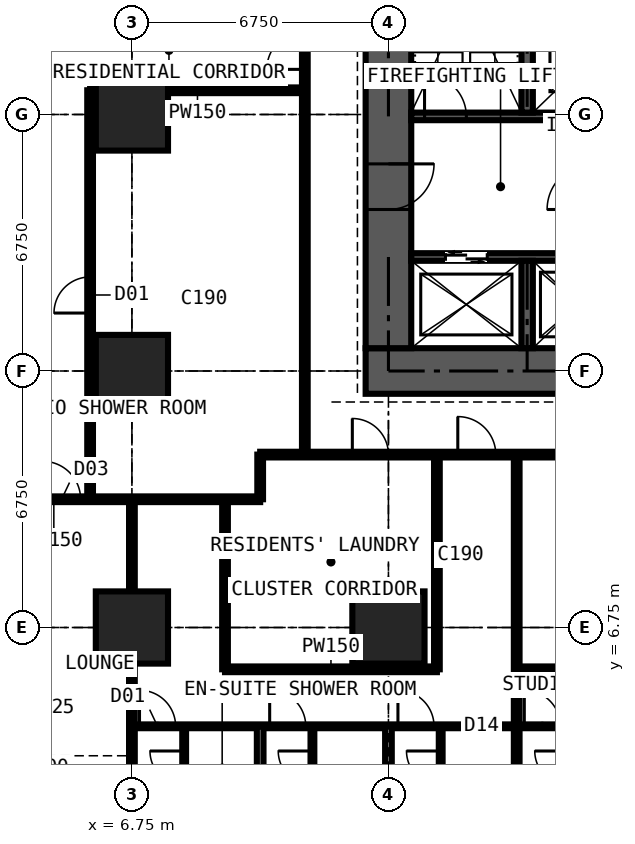
"""IFC4 building model, lengths in metres.
Left out: names, types, materials, properties, quantities, classifications, styles, units other than length and angle.
Written with IfcOpenShell. Run it as: python <this file> out.ifc"""

import sys

from ifc_helpers import new_model, si_unit, direction, frame, frame_2d, origin, origin_2d, place, context, subcontext, project, spatial, rectangle, extrude, element, fill, save


model = new_model("IFC4")
c1 = context("Model", 3, precision=1e-05, world=origin(), true_north=direction((0.0, 1.0)))
c2 = subcontext(c1, "Body", "Model", "MODEL_VIEW")
j1 = project(units=[si_unit("LENGTHUNIT", "METRE"), si_unit("PLANEANGLEUNIT", "RADIAN")], contexts=[c1])
p1 = place(None, origin())
s1 = spatial("IfcSite", under=j1, at=p1, CompositionType="ELEMENT")
p2 = place(p1, origin())
s2 = spatial("IfcBuilding", under=s1, at=p2, CompositionType="ELEMENT")
p3 = place(p2, frame((0.0, 0.0, 36.0)))
s3 = spatial("IfcBuildingStorey", under=s2, at=p3, CompositionType="ELEMENT", Elevation=36.0)
for number, where, z_axis, x_axis in (
    (1, (6.75, 6.75, 0.0), (0.0, 0.0, 1.0), (1.0, 0.0, 0.0)),
    (2, (6.75, 13.5, 0.0), (0.0, 0.0, 1.0), (1.0, 0.0, 0.0)),
    (3, (6.75, 20.25, 0.0), (0.0, 0.0, 1.0), (1.0, 0.0, 0.0)),
    (4, (13.5, 6.75, 0.0), (0.0, 0.0, 1.0), (1.0, 0.0, 0.0)),
):
    element("IfcColumn", number, at=place(p3, frame(where, z_axis=z_axis, x_axis=x_axis)), inside=s3, PredefinedType="COLUMN", context=c2, shape_type="SweptSolid", body=[
        extrude(rectangle(XDim=1.9, YDim=1.9, at=origin_2d()), origin(), (0.0, 0.0, 1.0), 3.6),
    ])
p4 = place(p3, frame((12.9, 13.5, 0.0), z_axis=(0.0, 0.0, 1.0), x_axis=(1.0, 0.0, 0.0)))
e5 = element("IfcWall", 5, at=p4, inside=s3, PredefinedType="SHEAR", context=c2, shape_type="SweptSolid", body=[
    extrude(rectangle(XDim=14.7, YDim=1.2, at=frame_2d((7.35, 0.0))), origin(), (0.0, 0.0, 1.0), 3.6),
])
p5 = place(p3, frame((13.5, 26.4, 0.0), z_axis=(0.0, 0.0, 1.0), x_axis=(0.0, -1.0, 0.0)))
e6 = element("IfcWall", 6, at=p5, inside=s3, PredefinedType="SHEAR", context=c2, shape_type="SweptSolid", body=[
    extrude(rectangle(XDim=12.3, YDim=1.2, at=frame_2d((6.15, 0.0))), origin(), (0.0, 0.0, 1.0), 3.6),
])
p6 = place(p5, frame((7.45, 0.0, 0.0)))
e7 = element("IfcOpeningElement", 7, at=p6, cuts=e6, PredefinedType="OPENING", context=c2, shape_type="SweptSolid", body=[
    extrude(rectangle(XDim=1.2, YDim=2.2, at=frame_2d((0.6, 1.1))), frame((0.0, 0.61, 0.0), z_axis=(0.0, -1.0, 0.0), x_axis=(1.0, 0.0, 0.0)), (0.0, 0.0, 1.0), 1.22),
])
p7 = place(p3, frame((14.1, 16.5, 0.0), z_axis=(0.0, 0.0, 1.0), x_axis=(1.0, 0.0, 0.0)))
e8 = element("IfcWall", 8, at=p7, inside=s3, PredefinedType="SHEAR", context=c2, shape_type="SweptSolid", body=[
    extrude(rectangle(XDim=12.3, YDim=0.2, at=frame_2d((6.15, 0.0))), origin(), (0.0, 0.0, 1.0), 3.6),
])
p8 = place(p7, frame((0.9, 0.0, 0.0)))
e9 = element("IfcOpeningElement", 9, at=p8, cuts=e8, PredefinedType="OPENING", context=c2, shape_type="SweptSolid", body=[
    extrude(rectangle(XDim=1.1, YDim=2.2, at=frame_2d((0.55, 1.1))), frame((0.0, 0.11, 0.0), z_axis=(0.0, -1.0, 0.0), x_axis=(1.0, 0.0, 0.0)), (0.0, 0.0, 1.0), 0.22),
])
p9 = place(p7, frame((9.5, 0.0, 0.0)))
e10 = element("IfcOpeningElement", 10, at=p9, cuts=e8, PredefinedType="OPENING", context=c2, shape_type="SweptSolid", body=[
    extrude(rectangle(XDim=1.1, YDim=2.2, at=frame_2d((0.55, 1.1))), frame((0.0, 0.11, 0.0), z_axis=(0.0, -1.0, 0.0), x_axis=(1.0, 0.0, 0.0)), (0.0, 0.0, 1.0), 0.22),
])
p10 = place(p3, frame((14.1, 20.2, 0.0), z_axis=(0.0, 0.0, 1.0), x_axis=(1.0, 0.0, 0.0)))
e11 = element("IfcWall", 11, at=p10, inside=s3, PredefinedType="SHEAR", context=c2, shape_type="SweptSolid", body=[
    extrude(rectangle(XDim=12.3, YDim=0.2, at=frame_2d((6.15, 0.0))), origin(), (0.0, 0.0, 1.0), 3.6),
])
p11 = place(p10, frame((0.35, 0.0, 0.0)))
e12 = element("IfcOpeningElement", 12, at=p11, cuts=e11, PredefinedType="OPENING", context=c2, shape_type="SweptSolid", body=[
    extrude(rectangle(XDim=1.1, YDim=2.2, at=frame_2d((0.55, 1.1))), frame((0.0, 0.11, 0.0), z_axis=(0.0, -1.0, 0.0), x_axis=(1.0, 0.0, 0.0)), (0.0, 0.0, 1.0), 0.22),
])
p12 = place(p10, frame((9.75, 0.0, 0.0)))
e13 = element("IfcOpeningElement", 13, at=p12, cuts=e11, PredefinedType="OPENING", context=c2, shape_type="SweptSolid", body=[
    extrude(rectangle(XDim=1.1, YDim=2.2, at=frame_2d((0.55, 1.1))), frame((0.0, 0.11, 0.0), z_axis=(0.0, -1.0, 0.0), x_axis=(1.0, 0.0, 0.0)), (0.0, 0.0, 1.0), 0.22),
])
p13 = place(p3, frame((17.15, 20.3, 0.0), z_axis=(0.0, 0.0, 1.0), x_axis=(0.0, 1.0, 0.0)))
e14 = element("IfcWall", 14, at=p13, inside=s3, PredefinedType="SHEAR", context=c2, shape_type="SweptSolid", body=[
    extrude(rectangle(XDim=6.1, YDim=0.3, at=frame_2d((3.05, 0.0))), origin(), (0.0, 0.0, 1.0), 3.6),
])
p14 = place(p3, frame((17.15, 14.1, 0.0), z_axis=(0.0, 0.0, 1.0), x_axis=(0.0, 1.0, 0.0)))
e15 = element("IfcWall", 15, at=p14, inside=s3, PredefinedType="SHEAR", context=c2, shape_type="SweptSolid", body=[
    extrude(rectangle(XDim=2.3, YDim=0.3, at=frame_2d((1.15, 0.0))), origin(), (0.0, 0.0, 1.0), 3.6),
])
p15 = place(p3, frame((-0.734, 10.125, 0.0), z_axis=(0.0, 0.0, 1.0), x_axis=(1.0, 0.0, 0.0)))
e16 = element("IfcWall", 16, at=p15, inside=s3, PredefinedType="PARTITIONING", context=c2, shape_type="SweptSolid", body=[
    extrude(rectangle(XDim=10.859, YDim=0.15, at=frame_2d((5.429, 0.0))), origin(), (0.0, 0.0, 1.0), 3.375),
])
p16 = place(p15, frame((5.134, 0.0, 0.0)))
e17 = element("IfcOpeningElement", 17, at=p16, cuts=e16, PredefinedType="OPENING", context=c2, shape_type="SweptSolid", body=[
    extrude(rectangle(XDim=1.0, YDim=2.2, at=frame_2d((0.5, 1.1))), frame((0.0, 0.085, 0.0), z_axis=(0.0, -1.0, 0.0), x_axis=(1.0, 0.0, 0.0)), (0.0, 0.0, 1.0), 0.17),
])
p17 = place(p3, frame((5.65, 10.125, 0.0), z_axis=(0.0, 0.0, 1.0), x_axis=(0.0, 1.0, 0.0)))
e18 = element("IfcWall", 18, at=p17, inside=s3, PredefinedType="PARTITIONING", context=c2, shape_type="SweptSolid", body=[
    extrude(rectangle(XDim=10.762, YDim=0.15, at=frame_2d((5.381, 0.0))), origin(), (0.0, 0.0, 1.0), 3.375),
])
p18 = place(p17, frame((4.9, 0.0, 0.0)))
e19 = element("IfcOpeningElement", 19, at=p18, cuts=e18, PredefinedType="OPENING", context=c2, shape_type="SweptSolid", body=[
    extrude(rectangle(XDim=0.95, YDim=2.2, at=frame_2d((0.475, 1.1))), frame((0.0, 0.085, 0.0), z_axis=(0.0, -1.0, 0.0), x_axis=(1.0, 0.0, 0.0)), (0.0, 0.0, 1.0), 0.17),
])
p19 = place(p3, frame((5.65, 20.887, 0.0), z_axis=(0.0, 0.0, 1.0), x_axis=(1.0, 0.0, 0.0)))
e20 = element("IfcWall", 20, at=p19, inside=s3, PredefinedType="PARTITIONING", context=c2, shape_type="SweptSolid", body=[
    extrude(rectangle(XDim=5.65, YDim=0.15, at=frame_2d((2.825, 0.0))), origin(), (0.0, 0.0, 1.0), 3.375),
])
p20 = place(p3, frame((6.75, -0.734, 0.0), z_axis=(0.0, 0.0, 1.0), x_axis=(0.0, 1.0, 0.0)))
e21 = element("IfcWall", 21, at=p20, inside=s3, PredefinedType="PARTITIONING", context=c2, shape_type="SweptSolid", body=[
    extrude(rectangle(XDim=10.859, YDim=0.15, at=frame_2d((5.429, 0.0))), origin(), (0.0, 0.0, 1.0), 2.877),
])
p21 = place(p3, frame((6.75, 4.15, 0.0), z_axis=(0.0, 0.0, 1.0), x_axis=(1.0, 0.0, 0.0)))
e22 = element("IfcWall", 22, at=p21, inside=s3, PredefinedType="PARTITIONING", context=c2, shape_type="SweptSolid", body=[
    extrude(rectangle(XDim=23.625, YDim=0.1, at=frame_2d((11.812, 0.0))), origin(), (0.0, 0.0, 1.0), 3.375),
])
p22 = place(p21, frame((0.2, 0.0, 0.0)))
e23 = element("IfcOpeningElement", 23, at=p22, cuts=e22, PredefinedType="OPENING", context=c2, shape_type="SweptSolid", body=[
    extrude(rectangle(XDim=0.95, YDim=2.2, at=frame_2d((0.475, 1.1))), frame((0.0, 0.06, 0.0), z_axis=(0.0, -1.0, 0.0), x_axis=(1.0, 0.0, 0.0)), (0.0, 0.0, 1.0), 0.12),
])
p23 = place(p21, frame((3.625, 0.0, 0.0)))
e24 = element("IfcOpeningElement", 24, at=p23, cuts=e22, PredefinedType="OPENING", context=c2, shape_type="SweptSolid", body=[
    extrude(rectangle(XDim=0.95, YDim=2.2, at=frame_2d((0.475, 1.1))), frame((0.0, 0.06, 0.0), z_axis=(0.0, -1.0, 0.0), x_axis=(1.0, 0.0, 0.0)), (0.0, 0.0, 1.0), 0.12),
])
p24 = place(p21, frame((7.0, 0.0, 0.0)))
e25 = element("IfcOpeningElement", 25, at=p24, cuts=e22, PredefinedType="OPENING", context=c2, shape_type="SweptSolid", body=[
    extrude(rectangle(XDim=0.95, YDim=2.2, at=frame_2d((0.475, 1.1))), frame((0.0, 0.06, 0.0), z_axis=(0.0, -1.0, 0.0), x_axis=(1.0, 0.0, 0.0)), (0.0, 0.0, 1.0), 0.12),
])
p25 = place(p21, frame((10.325, 0.0, 0.0)))
e26 = element("IfcOpeningElement", 26, at=p25, cuts=e22, PredefinedType="OPENING", context=c2, shape_type="SweptSolid", body=[
    extrude(rectangle(XDim=0.95, YDim=2.2, at=frame_2d((0.475, 1.1))), frame((0.0, 0.06, 0.0), z_axis=(0.0, -1.0, 0.0), x_axis=(1.0, 0.0, 0.0)), (0.0, 0.0, 1.0), 0.12),
])
p26 = place(p21, frame((13.75, 0.0, 0.0)))
e27 = element("IfcOpeningElement", 27, at=p26, cuts=e22, PredefinedType="OPENING", context=c2, shape_type="SweptSolid", body=[
    extrude(rectangle(XDim=0.95, YDim=2.2, at=frame_2d((0.475, 1.1))), frame((0.0, 0.06, 0.0), z_axis=(0.0, -1.0, 0.0), x_axis=(1.0, 0.0, 0.0)), (0.0, 0.0, 1.0), 0.12),
])
p27 = place(p21, frame((17.125, 0.0, 0.0)))
e28 = element("IfcOpeningElement", 28, at=p27, cuts=e22, PredefinedType="OPENING", context=c2, shape_type="SweptSolid", body=[
    extrude(rectangle(XDim=0.95, YDim=2.2, at=frame_2d((0.475, 1.1))), frame((0.0, 0.06, 0.0), z_axis=(0.0, -1.0, 0.0), x_axis=(1.0, 0.0, 0.0)), (0.0, 0.0, 1.0), 0.12),
])
p28 = place(p21, frame((20.5, 0.0, 0.0)))
e29 = element("IfcOpeningElement", 29, at=p28, cuts=e22, PredefinedType="OPENING", context=c2, shape_type="SweptSolid", body=[
    extrude(rectangle(XDim=0.95, YDim=2.2, at=frame_2d((0.475, 1.1))), frame((0.0, 0.06, 0.0), z_axis=(0.0, -1.0, 0.0), x_axis=(1.0, 0.0, 0.0)), (0.0, 0.0, 1.0), 0.12),
])
p29 = place(p3, frame((8.125, 1.95, 0.0), z_axis=(0.0, 0.0, 1.0), x_axis=(0.0, 1.0, 0.0)))
e30 = element("IfcWall", 30, at=p29, inside=s3, PredefinedType="PARTITIONING", context=c2, shape_type="SweptSolid", body=[
    extrude(rectangle(XDim=2.2, YDim=0.1, at=frame_2d((1.1, 0.0))), origin(), (0.0, 0.0, 1.0), 3.375),
])
p30 = place(p29, frame((0.65, 0.0, 0.0)))
e31 = element("IfcOpeningElement", 31, at=p30, cuts=e30, PredefinedType="OPENING", context=c2, shape_type="SweptSolid", body=[
    extrude(rectangle(XDim=0.9, YDim=2.2, at=frame_2d((0.45, 1.1))), frame((0.0, 0.06, 0.0), z_axis=(0.0, -1.0, 0.0), x_axis=(1.0, 0.0, 0.0)), (0.0, 0.0, 1.0), 0.12),
])
p31 = place(p3, frame((9.2, 5.65, 0.0), z_axis=(0.0, 0.0, 1.0), x_axis=(0.0, 1.0, 0.0)))
e32 = element("IfcWall", 32, at=p31, inside=s3, PredefinedType="PARTITIONING", context=c2, shape_type="SweptSolid", body=[
    extrude(rectangle(XDim=4.475, YDim=0.15, at=frame_2d((2.238, 0.0))), origin(), (0.0, 0.0, 1.0), 3.375),
])
p32 = place(p3, frame((9.2, 5.65, 0.0), z_axis=(0.0, 0.0, 1.0), x_axis=(1.0, 0.0, 0.0)))
e33 = element("IfcWall", 33, at=p32, inside=s3, PredefinedType="PARTITIONING", context=c2, shape_type="SweptSolid", body=[
    extrude(rectangle(XDim=5.575, YDim=0.15, at=frame_2d((2.788, 0.0))), origin(), (0.0, 0.0, 1.0), 3.375),
])
p33 = place(p3, frame((10.125, -0.734, 0.0), z_axis=(0.0, 0.0, 1.0), x_axis=(0.0, 1.0, 0.0)))
e34 = element("IfcWall", 34, at=p33, inside=s3, PredefinedType="PARTITIONING", context=c2, shape_type="SweptSolid", body=[
    extrude(rectangle(XDim=4.884, YDim=0.175, at=frame_2d((2.442, 0.0))), origin(), (0.0, 0.0, 1.0), 3.375),
])
p34 = place(p3, frame((10.125, 10.125, 0.0), z_axis=(0.0, 0.0, 1.0), x_axis=(0.0, 1.0, 0.0)))
e35 = element("IfcWall", 35, at=p34, inside=s3, PredefinedType="PARTITIONING", context=c2, shape_type="SweptSolid", body=[
    extrude(rectangle(XDim=1.175, YDim=0.15, at=frame_2d((0.587, 0.0))), origin(), (0.0, 0.0, 1.0), 3.375),
])
p35 = place(p3, frame((10.125, 11.3, 0.0), z_axis=(0.0, 0.0, 1.0), x_axis=(1.0, 0.0, 0.0)))
e36 = element("IfcWall", 36, at=p35, inside=s3, PredefinedType="PARTITIONING", context=c2, shape_type="SweptSolid", body=[
    extrude(rectangle(XDim=20.675, YDim=0.15, at=frame_2d((10.337, 0.0))), origin(), (0.0, 0.0, 1.0), 3.375),
])
p36 = place(p35, frame((5.2, 0.0, 0.0)))
e37 = element("IfcOpeningElement", 37, at=p36, cuts=e36, PredefinedType="OPENING", context=c2, shape_type="SweptSolid", body=[
    extrude(rectangle(XDim=1.0, YDim=2.2, at=frame_2d((0.5, 1.1))), frame((0.0, 0.085, 0.0), z_axis=(0.0, -1.0, 0.0), x_axis=(1.0, 0.0, 0.0)), (0.0, 0.0, 1.0), 0.17),
])
p37 = place(p35, frame((11.312, 0.0, 0.0)))
e38 = element("IfcOpeningElement", 38, at=p37, cuts=e36, PredefinedType="OPENING", context=c2, shape_type="SweptSolid", body=[
    extrude(rectangle(XDim=1.0, YDim=2.2, at=frame_2d((0.5, 1.1))), frame((0.0, 0.085, 0.0), z_axis=(0.0, -1.0, 0.0), x_axis=(1.0, 0.0, 0.0)), (0.0, 0.0, 1.0), 0.17),
])
p38 = place(p35, frame((2.425, 0.0, 0.0)))
e39 = element("IfcOpeningElement", 39, at=p38, cuts=e36, PredefinedType="OPENING", context=c2, shape_type="SweptSolid", body=[
    extrude(rectangle(XDim=0.95, YDim=2.2, at=frame_2d((0.475, 1.1))), frame((0.0, 0.085, 0.0), z_axis=(0.0, -1.0, 0.0), x_axis=(1.0, 0.0, 0.0)), (0.0, 0.0, 1.0), 0.17),
])
p39 = place(p3, frame((11.3, 11.3, 0.0), z_axis=(0.0, 0.0, 1.0), x_axis=(0.0, 1.0, 0.0)))
e40 = element("IfcWall", 40, at=p39, inside=s3, PredefinedType="PARTITIONING", context=c2, shape_type="SweptSolid", body=[
    extrude(rectangle(XDim=19.075, YDim=0.15, at=frame_2d((9.538, 0.0))), origin(), (0.0, 0.0, 1.0), 3.375),
])
p40 = place(p39, frame((10.137, 0.0, 0.0)))
e41 = element("IfcOpeningElement", 41, at=p40, cuts=e40, PredefinedType="OPENING", context=c2, shape_type="SweptSolid", body=[
    extrude(rectangle(XDim=1.0, YDim=2.2, at=frame_2d((0.5, 1.1))), frame((0.0, 0.085, 0.0), z_axis=(0.0, -1.0, 0.0), x_axis=(1.0, 0.0, 0.0)), (0.0, 0.0, 1.0), 0.17),
])
p41 = place(p3, frame((11.5, 1.95, 0.0), z_axis=(0.0, 0.0, 1.0), x_axis=(0.0, 1.0, 0.0)))
e42 = element("IfcWall", 42, at=p41, inside=s3, PredefinedType="PARTITIONING", context=c2, shape_type="SweptSolid", body=[
    extrude(rectangle(XDim=2.2, YDim=0.1, at=frame_2d((1.1, 0.0))), origin(), (0.0, 0.0, 1.0), 3.375),
])
p42 = place(p41, frame((0.65, 0.0, 0.0)))
e43 = element("IfcOpeningElement", 43, at=p42, cuts=e42, PredefinedType="OPENING", context=c2, shape_type="SweptSolid", body=[
    extrude(rectangle(XDim=0.9, YDim=2.2, at=frame_2d((0.45, 1.1))), frame((0.0, 0.06, 0.0), z_axis=(0.0, -1.0, 0.0), x_axis=(1.0, 0.0, 0.0)), (0.0, 0.0, 1.0), 0.12),
])
p43 = place(p3, frame((13.5, -0.734, 0.0), z_axis=(0.0, 0.0, 1.0), x_axis=(0.0, 1.0, 0.0)))
e44 = element("IfcWall", 44, at=p43, inside=s3, PredefinedType="PARTITIONING", context=c2, shape_type="SweptSolid", body=[
    extrude(rectangle(XDim=4.884, YDim=0.175, at=frame_2d((2.442, 0.0))), origin(), (0.0, 0.0, 1.0), 2.61),
])
p44 = place(p3, frame((14.775, 5.65, 0.0), z_axis=(0.0, 0.0, 1.0), x_axis=(0.0, 1.0, 0.0)))
e45 = element("IfcWall", 45, at=p44, inside=s3, PredefinedType="PARTITIONING", context=c2, shape_type="SweptSolid", body=[
    extrude(rectangle(XDim=5.65, YDim=0.15, at=frame_2d((2.825, 0.0))), origin(), (0.0, 0.0, 1.0), 3.375),
])
p45 = place(p3, frame((14.875, 1.95, 0.0), z_axis=(0.0, 0.0, 1.0), x_axis=(0.0, 1.0, 0.0)))
e46 = element("IfcWall", 46, at=p45, inside=s3, PredefinedType="PARTITIONING", context=c2, shape_type="SweptSolid", body=[
    extrude(rectangle(XDim=2.2, YDim=0.1, at=frame_2d((1.1, 0.0))), origin(), (0.0, 0.0, 1.0), 3.375),
])
p46 = place(p45, frame((0.65, 0.0, 0.0)))
e47 = element("IfcOpeningElement", 47, at=p46, cuts=e46, PredefinedType="OPENING", context=c2, shape_type="SweptSolid", body=[
    extrude(rectangle(XDim=0.9, YDim=2.2, at=frame_2d((0.45, 1.1))), frame((0.0, 0.06, 0.0), z_axis=(0.0, -1.0, 0.0), x_axis=(1.0, 0.0, 0.0)), (0.0, 0.0, 1.0), 0.12),
])
p47 = place(p3, frame((16.875, -0.734, 0.0), z_axis=(0.0, 0.0, 1.0), x_axis=(0.0, 1.0, 0.0)))
e48 = element("IfcWall", 48, at=p47, inside=s3, PredefinedType="PARTITIONING", context=c2, shape_type="SweptSolid", body=[
    extrude(rectangle(XDim=12.034, YDim=0.15, at=frame_2d((6.017, 0.0))), origin(), (0.0, 0.0, 1.0), 3.375),
])
p48 = place(p3, frame((16.875, 5.65, 0.0), z_axis=(0.0, 0.0, 1.0), x_axis=(1.0, 0.0, 0.0)))
e49 = element("IfcWall", 49, at=p48, inside=s3, PredefinedType="PARTITIONING", context=c2, shape_type="SweptSolid", body=[
    extrude(rectangle(XDim=2.145, YDim=0.15, at=frame_2d((1.073, 0.0))), origin(), (0.0, 0.0, 1.0), 3.375),
])
p49 = place(p8, origin())
e50 = element("IfcDoor", 50, at=p49, inside=s3, OperationType="DOUBLE_DOOR_SLIDING", PredefinedType="DOOR", context=c2, shape_type="SweptSolid", body=[
    extrude(rectangle(XDim=1.1, YDim=2.2, at=frame_2d((0.55, 1.1))), frame((0.0, 0.025, 0.0), z_axis=(0.0, -1.0, 0.0), x_axis=(1.0, 0.0, 0.0)), (0.0, 0.0, 1.0), 0.05),
])
fill(e9, e50)
p50 = place(p6, origin())
e51 = element("IfcDoor", 51, at=p50, inside=s3, OperationType="DOUBLE_DOOR_SINGLE_SWING", PredefinedType="DOOR", context=c2, shape_type="SweptSolid", body=[
    extrude(rectangle(XDim=1.2, YDim=2.2, at=frame_2d((0.6, 1.1))), frame((0.0, 0.025, 0.0), z_axis=(0.0, -1.0, 0.0), x_axis=(1.0, 0.0, 0.0)), (0.0, 0.0, 1.0), 0.05),
])
fill(e7, e51)
p51 = place(p11, origin())
e52 = element("IfcDoor", 52, at=p51, inside=s3, OperationType="SINGLE_SWING_LEFT", PredefinedType="DOOR", context=c2, shape_type="SweptSolid", body=[
    extrude(rectangle(XDim=1.1, YDim=2.2, at=frame_2d((0.55, 1.1))), frame((0.0, 0.025, 0.0), z_axis=(0.0, -1.0, 0.0), x_axis=(1.0, 0.0, 0.0)), (0.0, 0.0, 1.0), 0.05),
])
fill(e12, e52)
p52 = place(p16, origin())
e53 = element("IfcDoor", 53, at=p52, inside=s3, OperationType="SINGLE_SWING_LEFT", PredefinedType="DOOR", context=c2, shape_type="SweptSolid", body=[
    extrude(rectangle(XDim=1.0, YDim=2.2, at=frame_2d((0.5, 1.1))), frame((0.0, 0.025, 0.0), z_axis=(0.0, -1.0, 0.0), x_axis=(1.0, 0.0, 0.0)), (0.0, 0.0, 1.0), 0.05),
])
fill(e17, e53)
p53 = place(p22, origin())
e54 = element("IfcDoor", 54, at=p53, inside=s3, OperationType="SINGLE_SWING_LEFT", PredefinedType="DOOR", context=c2, shape_type="SweptSolid", body=[
    extrude(rectangle(XDim=0.95, YDim=2.2, at=frame_2d((0.475, 1.1))), frame((0.0, 0.025, 0.0), z_axis=(0.0, -1.0, 0.0), x_axis=(1.0, 0.0, 0.0)), (0.0, 0.0, 1.0), 0.05),
])
fill(e23, e54)
p54 = place(p30, origin())
e55 = element("IfcDoor", 55, at=p54, inside=s3, OperationType="SINGLE_SWING_RIGHT", PredefinedType="DOOR", context=c2, shape_type="SweptSolid", body=[
    extrude(rectangle(XDim=0.9, YDim=2.2, at=frame_2d((0.45, 1.1))), frame((0.0, 0.025, 0.0), z_axis=(0.0, -1.0, 0.0), x_axis=(1.0, 0.0, 0.0)), (0.0, 0.0, 1.0), 0.05),
])
fill(e31, e55)
p55 = place(p23, origin())
e56 = element("IfcDoor", 56, at=p55, inside=s3, OperationType="SINGLE_SWING_LEFT", PredefinedType="DOOR", context=c2, shape_type="SweptSolid", body=[
    extrude(rectangle(XDim=0.95, YDim=2.2, at=frame_2d((0.475, 1.1))), frame((0.0, 0.025, 0.0), z_axis=(0.0, -1.0, 0.0), x_axis=(1.0, 0.0, 0.0)), (0.0, 0.0, 1.0), 0.05),
])
fill(e24, e56)
p56 = place(p42, origin())
e57 = element("IfcDoor", 57, at=p56, inside=s3, OperationType="SINGLE_SWING_RIGHT", PredefinedType="DOOR", context=c2, shape_type="SweptSolid", body=[
    extrude(rectangle(XDim=0.9, YDim=2.2, at=frame_2d((0.45, 1.1))), frame((0.0, 0.025, 0.0), z_axis=(0.0, -1.0, 0.0), x_axis=(1.0, 0.0, 0.0)), (0.0, 0.0, 1.0), 0.05),
])
fill(e43, e57)
p57 = place(p24, origin())
e58 = element("IfcDoor", 58, at=p57, inside=s3, OperationType="SINGLE_SWING_LEFT", PredefinedType="DOOR", context=c2, shape_type="SweptSolid", body=[
    extrude(rectangle(XDim=0.95, YDim=2.2, at=frame_2d((0.475, 1.1))), frame((0.0, 0.025, 0.0), z_axis=(0.0, -1.0, 0.0), x_axis=(1.0, 0.0, 0.0)), (0.0, 0.0, 1.0), 0.05),
])
fill(e25, e58)
p58 = place(p46, origin())
e59 = element("IfcDoor", 59, at=p58, inside=s3, OperationType="SINGLE_SWING_RIGHT", PredefinedType="DOOR", context=c2, shape_type="SweptSolid", body=[
    extrude(rectangle(XDim=0.9, YDim=2.2, at=frame_2d((0.45, 1.1))), frame((0.0, 0.025, 0.0), z_axis=(0.0, -1.0, 0.0), x_axis=(1.0, 0.0, 0.0)), (0.0, 0.0, 1.0), 0.05),
])
fill(e47, e59)
p59 = place(p36, origin())
e60 = element("IfcDoor", 60, at=p59, inside=s3, OperationType="SINGLE_SWING_LEFT", PredefinedType="DOOR", context=c2, shape_type="SweptSolid", body=[
    extrude(rectangle(XDim=1.0, YDim=2.2, at=frame_2d((0.5, 1.1))), frame((0.0, 0.025, 0.0), z_axis=(0.0, -1.0, 0.0), x_axis=(1.0, 0.0, 0.0)), (0.0, 0.0, 1.0), 0.05),
])
fill(e37, e60)
p60 = place(p25, origin())
e61 = element("IfcDoor", 61, at=p60, inside=s3, OperationType="SINGLE_SWING_LEFT", PredefinedType="DOOR", context=c2, shape_type="SweptSolid", body=[
    extrude(rectangle(XDim=0.95, YDim=2.2, at=frame_2d((0.475, 1.1))), frame((0.0, 0.025, 0.0), z_axis=(0.0, -1.0, 0.0), x_axis=(1.0, 0.0, 0.0)), (0.0, 0.0, 1.0), 0.05),
])
fill(e26, e61)
p61 = place(p38, origin())
e62 = element("IfcDoor", 62, at=p61, inside=s3, OperationType="SINGLE_SWING_LEFT", PredefinedType="DOOR", context=c2, shape_type="SweptSolid", body=[
    extrude(rectangle(XDim=0.95, YDim=2.2, at=frame_2d((0.475, 1.1))), frame((0.0, 0.025, 0.0), z_axis=(0.0, -1.0, 0.0), x_axis=(1.0, 0.0, 0.0)), (0.0, 0.0, 1.0), 0.05),
])
fill(e39, e62)
p62 = place(p40, origin())
e63 = element("IfcDoor", 63, at=p62, inside=s3, OperationType="SINGLE_SWING_LEFT", PredefinedType="DOOR", context=c2, shape_type="SweptSolid", body=[
    extrude(rectangle(XDim=1.0, YDim=2.2, at=frame_2d((0.5, 1.1))), frame((0.0, 0.025, 0.0), z_axis=(0.0, -1.0, 0.0), x_axis=(1.0, 0.0, 0.0)), (0.0, 0.0, 1.0), 0.05),
])
fill(e41, e63)
p63 = place(p18, origin())
e64 = element("IfcDoor", 64, at=p63, inside=s3, OperationType="SINGLE_SWING_LEFT", PredefinedType="DOOR", context=c2, shape_type="SweptSolid", body=[
    extrude(rectangle(XDim=0.95, YDim=2.2, at=frame_2d((0.475, 1.1))), frame((0.0, 0.025, 0.0), z_axis=(0.0, -1.0, 0.0), x_axis=(1.0, 0.0, 0.0)), (0.0, 0.0, 1.0), 0.05),
])
fill(e19, e64)
save(model, sys.argv[1])
